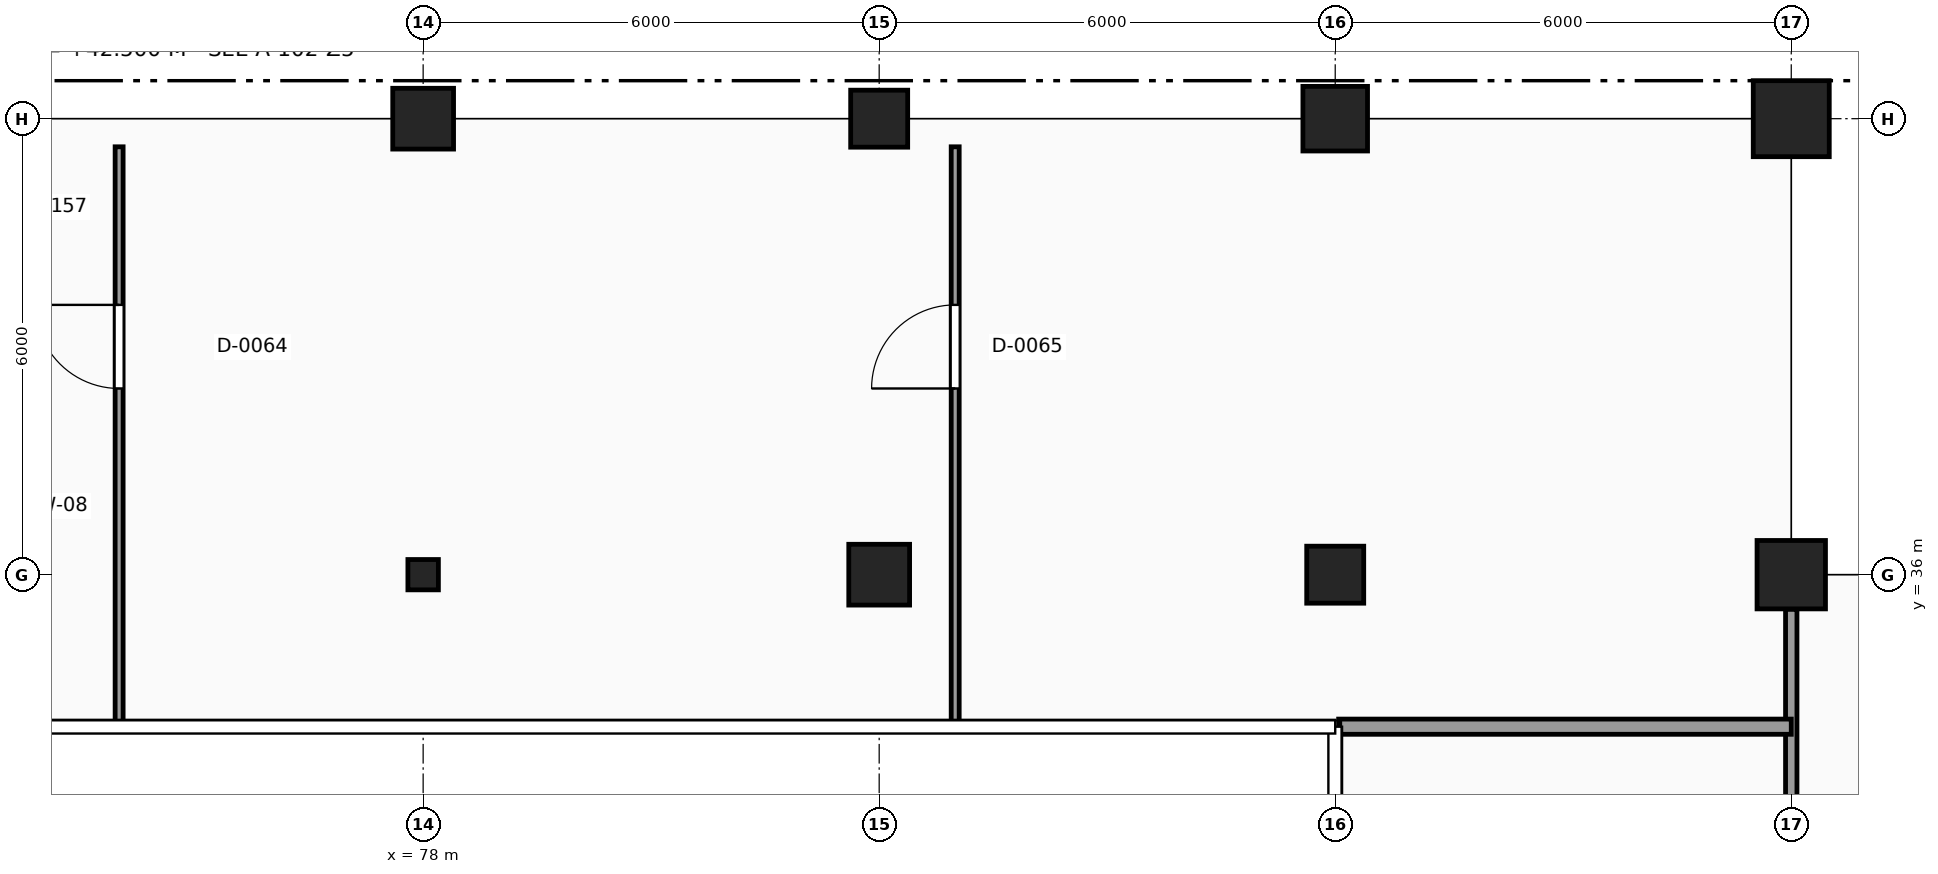
"""IFC4 building model, lengths in metres.
Left out: names, types, materials, properties, quantities, classifications, styles, units other than length and angle.
Written with IfcOpenShell. Run it as: python <this file> out.ifc"""

import sys

from ifc_helpers import new_model, si_unit, direction, frame, frame_2d, origin, origin_2d, place, context, subcontext, project, spatial, rectangle, circle, i_section, extrude, element, fill, save


model = new_model("IFC4")
c1 = context("Model", 3, precision=1e-05, world=origin(), true_north=direction((0.0, 1.0)))
c2 = subcontext(c1, "Body", "Model", "MODEL_VIEW")
j1 = project(units=[si_unit("LENGTHUNIT", "METRE"), si_unit("PLANEANGLEUNIT", "RADIAN")], contexts=[c1])
p1 = place(None, origin())
s1 = spatial("IfcSite", under=j1, at=p1, CompositionType="ELEMENT")
p2 = place(p1, origin())
s2 = spatial("IfcBuilding", under=s1, at=p2, CompositionType="ELEMENT")
p3 = place(p2, frame((0.0, 0.0, 6.0)))
s3 = spatial("IfcBuildingStorey", under=s2, at=p3, CompositionType="ELEMENT", Elevation=6.0)
p4 = place(p3, frame((78.0, 36.0, 0.0), z_axis=(0.0, 0.0, 1.0), x_axis=(1.0, 0.0, 0.0)))
e1 = element("IfcColumn", 1, at=p4, inside=s3, PredefinedType="COLUMN", context=c2, shape_type="SweptSolid", body=[
    extrude(i_section(OverallWidth=0.401, OverallDepth=0.399, WebThickness=0.019, FlangeThickness=0.03, FilletRadius=0.015, at=origin_2d()), origin(), (0.0, 0.0, 1.0), 4.5),
])
for number, where, z_axis, x_axis in (
    (2, (78.0, 42.0, 0.0), (0.0, 0.0, 1.0), (1.0, 0.0, 0.0)),
    (3, (84.0, 36.0, 0.0), (0.0, 0.0, 1.0), (1.0, 0.0, 0.0)),
):
    element("IfcColumn", number, at=place(p3, frame(where, z_axis=z_axis, x_axis=x_axis)), inside=s3, PredefinedType="COLUMN", context=c2, shape_type="SweptSolid", body=[
        extrude(rectangle(XDim=0.8, YDim=0.8, at=origin_2d()), origin(), (0.0, 0.0, 1.0), 4.5),
    ])
for number, where, z_axis, x_axis in (
    (4, (84.0, 42.0, 0.0), (0.0, 0.0, 1.0), (1.0, 0.0, 0.0)),
    (5, (90.0, 36.0, 0.0), (0.0, 0.0, 1.0), (1.0, 0.0, 0.0)),
):
    element("IfcColumn", number, at=place(p3, frame(where, z_axis=z_axis, x_axis=x_axis)), inside=s3, PredefinedType="COLUMN", context=c2, shape_type="SweptSolid", body=[
        extrude(rectangle(XDim=0.75, YDim=0.75, at=origin_2d()), origin(), (0.0, 0.0, 1.0), 4.5),
    ])
p5 = place(p3, frame((90.0, 42.0, 0.0), z_axis=(0.0, 0.0, 1.0), x_axis=(1.0, 0.0, 0.0)))
e6 = element("IfcColumn", 6, at=p5, inside=s3, PredefinedType="COLUMN", context=c2, shape_type="SweptSolid", body=[
    extrude(circle(Radius=0.425, at=origin_2d()), origin(), (0.0, 0.0, 1.0), 4.5),
])
p6 = place(p3, frame((96.0, 36.0, 0.0), z_axis=(0.0, 0.0, 1.0), x_axis=(1.0, 0.0, 0.0)))
e7 = element("IfcColumn", 7, at=p6, inside=s3, PredefinedType="COLUMN", context=c2, shape_type="SweptSolid", body=[
    extrude(rectangle(XDim=0.9, YDim=0.9, at=origin_2d()), origin(), (0.0, 0.0, 1.0), 4.5),
])
p7 = place(p3, frame((96.0, 42.0, 0.0), z_axis=(0.0, 0.0, 1.0), x_axis=(1.0, 0.0, 0.0)))
e8 = element("IfcColumn", 8, at=p7, inside=s3, PredefinedType="COLUMN", context=c2, shape_type="SweptSolid", body=[
    extrude(circle(Radius=0.5, at=origin_2d()), origin(), (0.0, 0.0, 1.0), 4.5),
])
p8 = place(p3, frame((74.0, 34.045, 0.0), z_axis=(0.0, 0.0, 1.0), x_axis=(0.0, 1.0, 0.0)))
e9 = element("IfcWall", 9, at=p8, inside=s3, PredefinedType="PARTITIONING", context=c2, shape_type="SweptSolid", body=[
    extrude(rectangle(XDim=7.585, YDim=0.105, at=frame_2d((3.792, 0.0))), origin(), (0.0, 0.0, 1.0), 4.22),
])
p9 = place(p8, frame((4.405, 0.0, 0.0)))
e10 = element("IfcOpeningElement", 10, at=p9, cuts=e9, PredefinedType="OPENING", context=c2, shape_type="SweptSolid", body=[
    extrude(rectangle(XDim=1.1, YDim=2.15, at=frame_2d((0.55, 1.075))), frame((0.0, 0.062, 0.0), z_axis=(0.0, -1.0, 0.0), x_axis=(1.0, 0.0, 0.0)), (0.0, 0.0, 1.0), 0.125),
])
p10 = place(p3, frame((85.0, 34.045, 0.0), z_axis=(0.0, 0.0, 1.0), x_axis=(0.0, 1.0, 0.0)))
e11 = element("IfcWall", 11, at=p10, inside=s3, PredefinedType="PARTITIONING", context=c2, shape_type="SweptSolid", body=[
    extrude(rectangle(XDim=7.585, YDim=0.105, at=frame_2d((3.792, 0.0))), origin(), (0.0, 0.0, 1.0), 4.22),
])
p11 = place(p10, frame((4.405, 0.0, 0.0)))
e12 = element("IfcOpeningElement", 12, at=p11, cuts=e11, PredefinedType="OPENING", context=c2, shape_type="SweptSolid", body=[
    extrude(rectangle(XDim=1.1, YDim=2.15, at=frame_2d((0.55, 1.075))), frame((0.0, 0.062, 0.0), z_axis=(0.0, -1.0, 0.0), x_axis=(1.0, 0.0, 0.0)), (0.0, 0.0, 1.0), 0.125),
])
p12 = place(p3, frame((96.0, 30.455, 0.0), z_axis=(0.0, 0.0, 1.0), x_axis=(0.0, 1.0, 0.0)))
e13 = element("IfcWall", 13, at=p12, inside=s3, PredefinedType="PARTITIONING", context=c2, shape_type="SweptSolid", body=[
    extrude(rectangle(XDim=5.09, YDim=0.15, at=frame_2d((2.545, 0.0))), origin(), (0.0, 0.0, 1.0), 3.67),
])
p13 = place(p3, frame((90.045, 34.0, 0.0), z_axis=(0.0, 0.0, 1.0), x_axis=(1.0, 0.0, 0.0)))
e14 = element("IfcWall", 14, at=p13, inside=s3, PredefinedType="PARTITIONING", context=c2, shape_type="SweptSolid", body=[
    extrude(rectangle(XDim=5.955, YDim=0.2, at=frame_2d((2.978, 0.0))), origin(), (0.0, 0.0, 1.0), 4.22),
])
p14 = place(p9, origin())
e15 = element("IfcDoor", 15, at=p14, inside=s3, OperationType="SINGLE_SWING_RIGHT", PredefinedType="DOOR", context=c2, shape_type="SweptSolid", body=[
    extrude(rectangle(XDim=1.1, YDim=2.15, at=frame_2d((0.55, 1.075))), frame((0.0, 0.025, 0.0), z_axis=(0.0, -1.0, 0.0), x_axis=(1.0, 0.0, 0.0)), (0.0, 0.0, 1.0), 0.05),
])
fill(e10, e15)
p15 = place(p11, origin())
e16 = element("IfcDoor", 16, at=p15, inside=s3, OperationType="SINGLE_SWING_LEFT", PredefinedType="DOOR", context=c2, shape_type="SweptSolid", body=[
    extrude(rectangle(XDim=1.1, YDim=2.15, at=frame_2d((0.55, 1.075))), frame((0.0, 0.025, 0.0), z_axis=(0.0, -1.0, 0.0), x_axis=(1.0, 0.0, 0.0)), (0.0, 0.0, 1.0), 0.05),
])
fill(e12, e16)
save(model, sys.argv[1])
